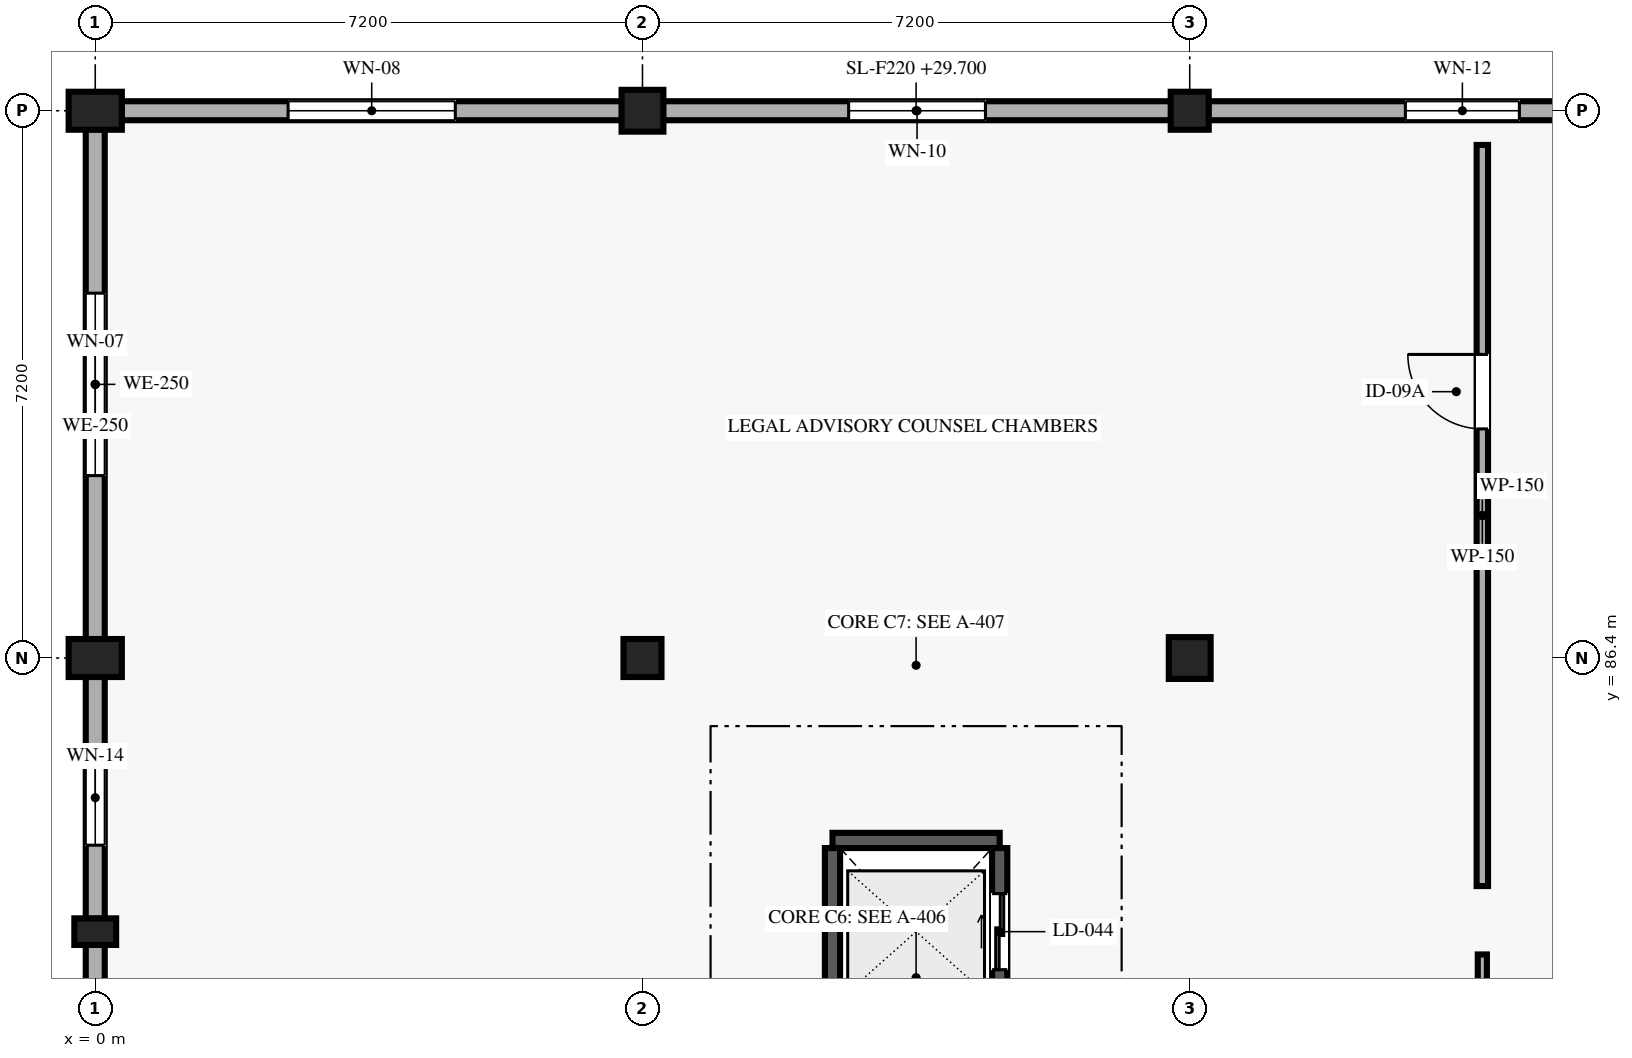
"""IFC4 building model, lengths in metres.
Left out: names, types, materials, properties, quantities, classifications, styles, units other than length and angle.
Written with IfcOpenShell. Run it as: python <this file> out.ifc"""

import sys

from ifc_helpers import new_model, si_unit, direction, frame, frame_2d, origin, origin_2d, place, context, subcontext, project, spatial, rectangle, extrude, element, fill, save


model = new_model("IFC4")
c1 = context("Model", 3, precision=1e-05, world=origin(), true_north=direction((0.0, 1.0)))
c2 = subcontext(c1, "Body", "Model", "MODEL_VIEW")
j1 = project(units=[si_unit("LENGTHUNIT", "METRE"), si_unit("PLANEANGLEUNIT", "RADIAN")], contexts=[c1])
p1 = place(None, origin())
s1 = spatial("IfcSite", under=j1, at=p1, CompositionType="ELEMENT")
p2 = place(p1, origin())
s2 = spatial("IfcBuilding", under=s1, at=p2, CompositionType="ELEMENT")
p3 = place(p2, frame((0.0, 0.0, 29.7)))
s3 = spatial("IfcBuildingStorey", under=s2, at=p3, CompositionType="ELEMENT", Elevation=29.7)
for number, where, z_axis, x_axis in (
    (1, (0.0, 86.4, 0.0), (0.0, 0.0, 1.0), (0.0, 1.0, 0.0)),
    (2, (0.0, 93.6, 0.0), (0.0, 0.0, 1.0), (0.0, 1.0, 0.0)),
):
    element("IfcColumn", number, at=place(p3, frame(where, z_axis=z_axis, x_axis=x_axis)), inside=s3, PredefinedType="COLUMN", context=c2, shape_type="SweptSolid", body=[
        extrude(rectangle(XDim=0.5, YDim=0.7, at=origin_2d()), origin(), (0.0, 0.0, 1.0), 4.05),
    ])
p4 = place(p3, frame((7.2, 86.4, 0.0), z_axis=(0.0, 0.0, 1.0), x_axis=(1.0, 0.0, 0.0)))
e3 = element("IfcColumn", 3, at=p4, inside=s3, PredefinedType="COLUMN", context=c2, shape_type="SweptSolid", body=[
    extrude(rectangle(XDim=0.5, YDim=0.5, at=origin_2d()), origin(), (0.0, 0.0, 1.0), 4.05),
])
for number, where, z_axis, x_axis in (
    (4, (7.2, 93.6, 0.0), (0.0, 0.0, 1.0), (1.0, 0.0, 0.0)),
    (5, (14.4, 86.4, 0.0), (0.0, 0.0, 1.0), (1.0, 0.0, 0.0)),
):
    element("IfcColumn", number, at=place(p3, frame(where, z_axis=z_axis, x_axis=x_axis)), inside=s3, PredefinedType="COLUMN", context=c2, shape_type="SweptSolid", body=[
        extrude(rectangle(XDim=0.55, YDim=0.55, at=origin_2d()), origin(), (0.0, 0.0, 1.0), 4.05),
    ])
p5 = place(p3, frame((14.4, 93.6, 0.0), z_axis=(0.0, 0.0, 1.0), x_axis=(1.0, 0.0, 0.0)))
e6 = element("IfcColumn", 6, at=p5, inside=s3, PredefinedType="COLUMN", context=c2, shape_type="SweptSolid", body=[
    extrude(rectangle(XDim=0.5, YDim=0.5, at=origin_2d()), origin(), (0.0, 0.0, 1.0), 4.05),
])
p6 = place(p3, frame((0.0, 82.8, 0.0), z_axis=(0.0, 0.0, 1.0), x_axis=(0.0, 1.0, 0.0)))
e7 = element("IfcColumn", 7, at=p6, inside=s3, PredefinedType="PILASTER", context=c2, shape_type="SweptSolid", body=[
    extrude(rectangle(XDim=0.35, YDim=0.55, at=origin_2d()), origin(), (0.0, 0.0, 1.0), 4.05),
])
p7 = place(p3, frame((0.345, 93.6, 0.0), z_axis=(0.0, 0.0, 1.0), x_axis=(1.0, 0.0, 0.0)))
e8 = element("IfcWall", 8, at=p7, inside=s3, PredefinedType="SOLIDWALL", context=c2, shape_type="SweptSolid", body=[
    extrude(rectangle(XDim=6.585, YDim=0.25, at=frame_2d((3.292, 0.0))), origin(), (0.0, 0.0, 1.0), 3.295),
])
p8 = place(p7, frame((2.192, 0.0, 0.85)))
e9 = element("IfcOpeningElement", 9, at=p8, cuts=e8, PredefinedType="OPENING", context=c2, shape_type="SweptSolid", body=[
    extrude(rectangle(XDim=2.2, YDim=1.7, at=frame_2d((1.1, 0.85))), frame((0.0, 0.135, 0.0), z_axis=(0.0, -1.0, 0.0), x_axis=(1.0, 0.0, 0.0)), (0.0, 0.0, 1.0), 0.27),
])
p9 = place(p3, frame((7.47, 93.6, 0.0), z_axis=(0.0, 0.0, 1.0), x_axis=(1.0, 0.0, 0.0)))
e10 = element("IfcWall", 10, at=p9, inside=s3, PredefinedType="SOLIDWALL", context=c2, shape_type="SweptSolid", body=[
    extrude(rectangle(XDim=6.685, YDim=0.25, at=frame_2d((3.343, 0.0))), origin(), (0.0, 0.0, 1.0), 3.295),
])
p10 = place(p9, frame((2.442, 0.0, 0.85)))
e11 = element("IfcOpeningElement", 11, at=p10, cuts=e10, PredefinedType="OPENING", context=c2, shape_type="SweptSolid", body=[
    extrude(rectangle(XDim=1.8, YDim=1.6, at=frame_2d((0.9, 0.8))), frame((0.0, 0.135, 0.0), z_axis=(0.0, -1.0, 0.0), x_axis=(1.0, 0.0, 0.0)), (0.0, 0.0, 1.0), 0.27),
])
p11 = place(p3, frame((14.645, 93.6, 0.0), z_axis=(0.0, 0.0, 1.0), x_axis=(1.0, 0.0, 0.0)))
e12 = element("IfcWall", 12, at=p11, inside=s3, PredefinedType="SOLIDWALL", context=c2, shape_type="SweptSolid", body=[
    extrude(rectangle(XDim=6.685, YDim=0.25, at=frame_2d((3.343, 0.0))), origin(), (0.0, 0.0, 1.0), 3.295),
])
p12 = place(p11, frame((2.593, 0.0, 0.85)))
e13 = element("IfcOpeningElement", 13, at=p12, cuts=e12, PredefinedType="OPENING", context=c2, shape_type="SweptSolid", body=[
    extrude(rectangle(XDim=1.5, YDim=2.05, at=frame_2d((0.75, 1.025))), frame((0.0, 0.135, 0.0), z_axis=(0.0, -1.0, 0.0), x_axis=(1.0, 0.0, 0.0)), (0.0, 0.0, 1.0), 0.27),
])
p13 = place(p3, frame((0.0, 79.445, 0.0), z_axis=(0.0, 0.0, 1.0), x_axis=(0.0, 1.0, 0.0)))
e14 = element("IfcWall", 14, at=p13, inside=s3, PredefinedType="SOLIDWALL", context=c2, shape_type="SweptSolid", body=[
    extrude(rectangle(XDim=3.185, YDim=0.25, at=frame_2d((1.592, 0.0))), origin(), (0.0, 0.0, 1.0), 3.295),
])
p14 = place(p13, frame((0.968, 0.0, 0.85)))
e15 = element("IfcOpeningElement", 15, at=p14, cuts=e14, PredefinedType="OPENING", context=c2, shape_type="SweptSolid", body=[
    extrude(rectangle(XDim=1.25, YDim=1.5, at=frame_2d((0.625, 0.75))), frame((0.0, 0.135, 0.0), z_axis=(0.0, -1.0, 0.0), x_axis=(1.0, 0.0, 0.0)), (0.0, 0.0, 1.0), 0.27),
])
p15 = place(p3, frame((0.0, 82.97, 0.0), z_axis=(0.0, 0.0, 1.0), x_axis=(0.0, 1.0, 0.0)))
e16 = element("IfcWall", 16, at=p15, inside=s3, PredefinedType="SOLIDWALL", context=c2, shape_type="SweptSolid", body=[
    extrude(rectangle(XDim=3.185, YDim=0.25, at=frame_2d((1.593, 0.0))), origin(), (0.0, 0.0, 1.0), 3.295),
])
p16 = place(p15, frame((0.968, 0.0, 0.85)))
e17 = element("IfcOpeningElement", 17, at=p16, cuts=e16, PredefinedType="OPENING", context=c2, shape_type="SweptSolid", body=[
    extrude(rectangle(XDim=1.25, YDim=1.5, at=frame_2d((0.625, 0.75))), frame((0.0, 0.135, 0.0), z_axis=(0.0, -1.0, 0.0), x_axis=(1.0, 0.0, 0.0)), (0.0, 0.0, 1.0), 0.27),
])
p17 = place(p3, frame((0.0, 86.645, 0.0), z_axis=(0.0, 0.0, 1.0), x_axis=(0.0, 1.0, 0.0)))
e18 = element("IfcWall", 18, at=p17, inside=s3, PredefinedType="SOLIDWALL", context=c2, shape_type="SweptSolid", body=[
    extrude(rectangle(XDim=6.71, YDim=0.25, at=frame_2d((3.355, 0.0))), origin(), (0.0, 0.0, 1.0), 3.295),
])
p18 = place(p17, frame((2.155, 0.0, 0.85)))
e19 = element("IfcOpeningElement", 19, at=p18, cuts=e18, PredefinedType="OPENING", context=c2, shape_type="SweptSolid", body=[
    extrude(rectangle(XDim=2.4, YDim=1.75, at=frame_2d((1.2, 0.875))), frame((0.0, 0.135, 0.0), z_axis=(0.0, -1.0, 0.0), x_axis=(1.0, 0.0, 0.0)), (0.0, 0.0, 1.0), 0.27),
])
for number, where, z_axis, x_axis in (
    (20, (9.7, 84.0, 0.0), (0.0, 0.0, 1.0), (1.0, 0.0, 0.0)),
    (21, (9.7, 81.7, 0.0), (0.0, 0.0, 1.0), (0.0, 1.0, 0.0)),
):
    element("IfcWall", number, at=place(p3, frame(where, z_axis=z_axis, x_axis=x_axis)), inside=s3, PredefinedType="SHEAR", context=c2, shape_type="SweptSolid", body=[
        extrude(rectangle(XDim=2.2, YDim=0.2, at=frame_2d((1.1, 0.0))), origin(), (0.0, 0.0, 1.0), 3.83),
    ])
p19 = place(p3, frame((11.9, 81.7, 0.0), z_axis=(0.0, 0.0, 1.0), x_axis=(0.0, 1.0, 0.0)))
e22 = element("IfcWall", 22, at=p19, inside=s3, PredefinedType="SHEAR", context=c2, shape_type="SweptSolid", body=[
    extrude(rectangle(XDim=2.2, YDim=0.2, at=frame_2d((1.1, 0.0))), origin(), (0.0, 0.0, 1.0), 3.83),
])
p20 = place(p19, frame((0.6, 0.0, 0.0)))
e23 = element("IfcOpeningElement", 23, at=p20, cuts=e22, PredefinedType="OPENING", context=c2, shape_type="SweptSolid", body=[
    extrude(rectangle(XDim=1.0, YDim=2.1, at=frame_2d((0.5, 1.05))), frame((0.0, 0.11, 0.0), z_axis=(0.0, -1.0, 0.0), x_axis=(1.0, 0.0, 0.0)), (0.0, 0.0, 1.0), 0.22),
])
p21 = place(p3, frame((18.25, 72.6, 0.0), z_axis=(0.0, 0.0, 1.0), x_axis=(0.0, 1.0, 0.0)))
e24 = element("IfcWall", 24, at=p21, inside=s3, PredefinedType="PARTITIONING", context=c2, shape_type="SweptSolid", body=[
    extrude(rectangle(XDim=9.9, YDim=0.12, at=frame_2d((4.95, 0.0))), origin(), (0.0, 0.0, 1.0), 3.83),
])
p22 = place(p21, frame((2.541, 0.0, 0.0)))
e25 = element("IfcOpeningElement", 25, at=p22, cuts=e24, PredefinedType="OPENING", context=c2, shape_type="SweptSolid", body=[
    extrude(rectangle(XDim=1.0, YDim=2.1, at=frame_2d((0.5, 1.05))), frame((0.0, 0.07, 0.0), z_axis=(0.0, -1.0, 0.0), x_axis=(1.0, 0.0, 0.0)), (0.0, 0.0, 1.0), 0.14),
])
p23 = place(p3, frame((18.25, 83.4, 0.0), z_axis=(0.0, 0.0, 1.0), x_axis=(0.0, 1.0, 0.0)))
e26 = element("IfcWall", 26, at=p23, inside=s3, PredefinedType="PARTITIONING", context=c2, shape_type="SweptSolid", body=[
    extrude(rectangle(XDim=9.75, YDim=0.15, at=frame_2d((4.875, 0.0))), origin(), (0.0, 0.0, 1.0), 3.83),
])
p24 = place(p23, frame((6.014, 0.0, 0.0)))
e27 = element("IfcOpeningElement", 27, at=p24, cuts=e26, PredefinedType="OPENING", context=c2, shape_type="SweptSolid", body=[
    extrude(rectangle(XDim=0.98, YDim=2.1, at=frame_2d((0.49, 1.05))), frame((0.0, 0.085, 0.0), z_axis=(0.0, -1.0, 0.0), x_axis=(1.0, 0.0, 0.0)), (0.0, 0.0, 1.0), 0.17),
])
p25 = place(p8, origin())
e28 = element("IfcWindow", 28, at=p25, inside=s3, PartitioningType="SINGLE_PANEL", PredefinedType="WINDOW", context=c2, shape_type="SweptSolid", body=[
    extrude(rectangle(XDim=2.2, YDim=1.7, at=frame_2d((1.1, 0.85))), frame((0.0, 0.03, 0.0), z_axis=(0.0, -1.0, 0.0), x_axis=(1.0, 0.0, 0.0)), (0.0, 0.0, 1.0), 0.06),
])
fill(e9, e28)
p26 = place(p10, origin())
e29 = element("IfcWindow", 29, at=p26, inside=s3, PartitioningType="SINGLE_PANEL", PredefinedType="WINDOW", context=c2, shape_type="SweptSolid", body=[
    extrude(rectangle(XDim=1.8, YDim=1.6, at=frame_2d((0.9, 0.8))), frame((0.0, 0.03, 0.0), z_axis=(0.0, -1.0, 0.0), x_axis=(1.0, 0.0, 0.0)), (0.0, 0.0, 1.0), 0.06),
])
fill(e11, e29)
p27 = place(p12, origin())
e30 = element("IfcWindow", 30, at=p27, inside=s3, PartitioningType="SINGLE_PANEL", PredefinedType="WINDOW", context=c2, shape_type="SweptSolid", body=[
    extrude(rectangle(XDim=1.5, YDim=2.05, at=frame_2d((0.75, 1.025))), frame((0.0, 0.03, 0.0), z_axis=(0.0, -1.0, 0.0), x_axis=(1.0, 0.0, 0.0)), (0.0, 0.0, 1.0), 0.06),
])
fill(e13, e30)
p28 = place(p16, origin())
e31 = element("IfcWindow", 31, at=p28, inside=s3, PartitioningType="SINGLE_PANEL", PredefinedType="WINDOW", context=c2, shape_type="SweptSolid", body=[
    extrude(rectangle(XDim=1.25, YDim=1.5, at=frame_2d((0.625, 0.75))), frame((0.0, 0.03, 0.0), z_axis=(0.0, -1.0, 0.0), x_axis=(1.0, 0.0, 0.0)), (0.0, 0.0, 1.0), 0.06),
])
fill(e17, e31)
p29 = place(p18, origin())
e32 = element("IfcWindow", 32, at=p29, inside=s3, PartitioningType="SINGLE_PANEL", PredefinedType="WINDOW", context=c2, shape_type="SweptSolid", body=[
    extrude(rectangle(XDim=2.4, YDim=1.75, at=frame_2d((1.2, 0.875))), frame((0.0, 0.03, 0.0), z_axis=(0.0, -1.0, 0.0), x_axis=(1.0, 0.0, 0.0)), (0.0, 0.0, 1.0), 0.06),
])
fill(e19, e32)
p30 = place(p20, origin())
e33 = element("IfcDoor", 33, at=p30, inside=s3, OperationType="DOUBLE_DOOR_SLIDING", PredefinedType="DOOR", context=c2, shape_type="SweptSolid", body=[
    extrude(rectangle(XDim=1.0, YDim=2.1, at=frame_2d((0.5, 1.05))), frame((0.0, 0.025, 0.0), z_axis=(0.0, -1.0, 0.0), x_axis=(1.0, 0.0, 0.0)), (0.0, 0.0, 1.0), 0.05),
])
fill(e23, e33)
p31 = place(p24, origin())
e34 = element("IfcDoor", 34, at=p31, inside=s3, OperationType="SINGLE_SWING_RIGHT", PredefinedType="DOOR", context=c2, shape_type="SweptSolid", body=[
    extrude(rectangle(XDim=0.98, YDim=2.1, at=frame_2d((0.49, 1.05))), frame((0.0, 0.025, 0.0), z_axis=(0.0, -1.0, 0.0), x_axis=(1.0, 0.0, 0.0)), (0.0, 0.0, 1.0), 0.05),
])
fill(e27, e34)
save(model, sys.argv[1])
